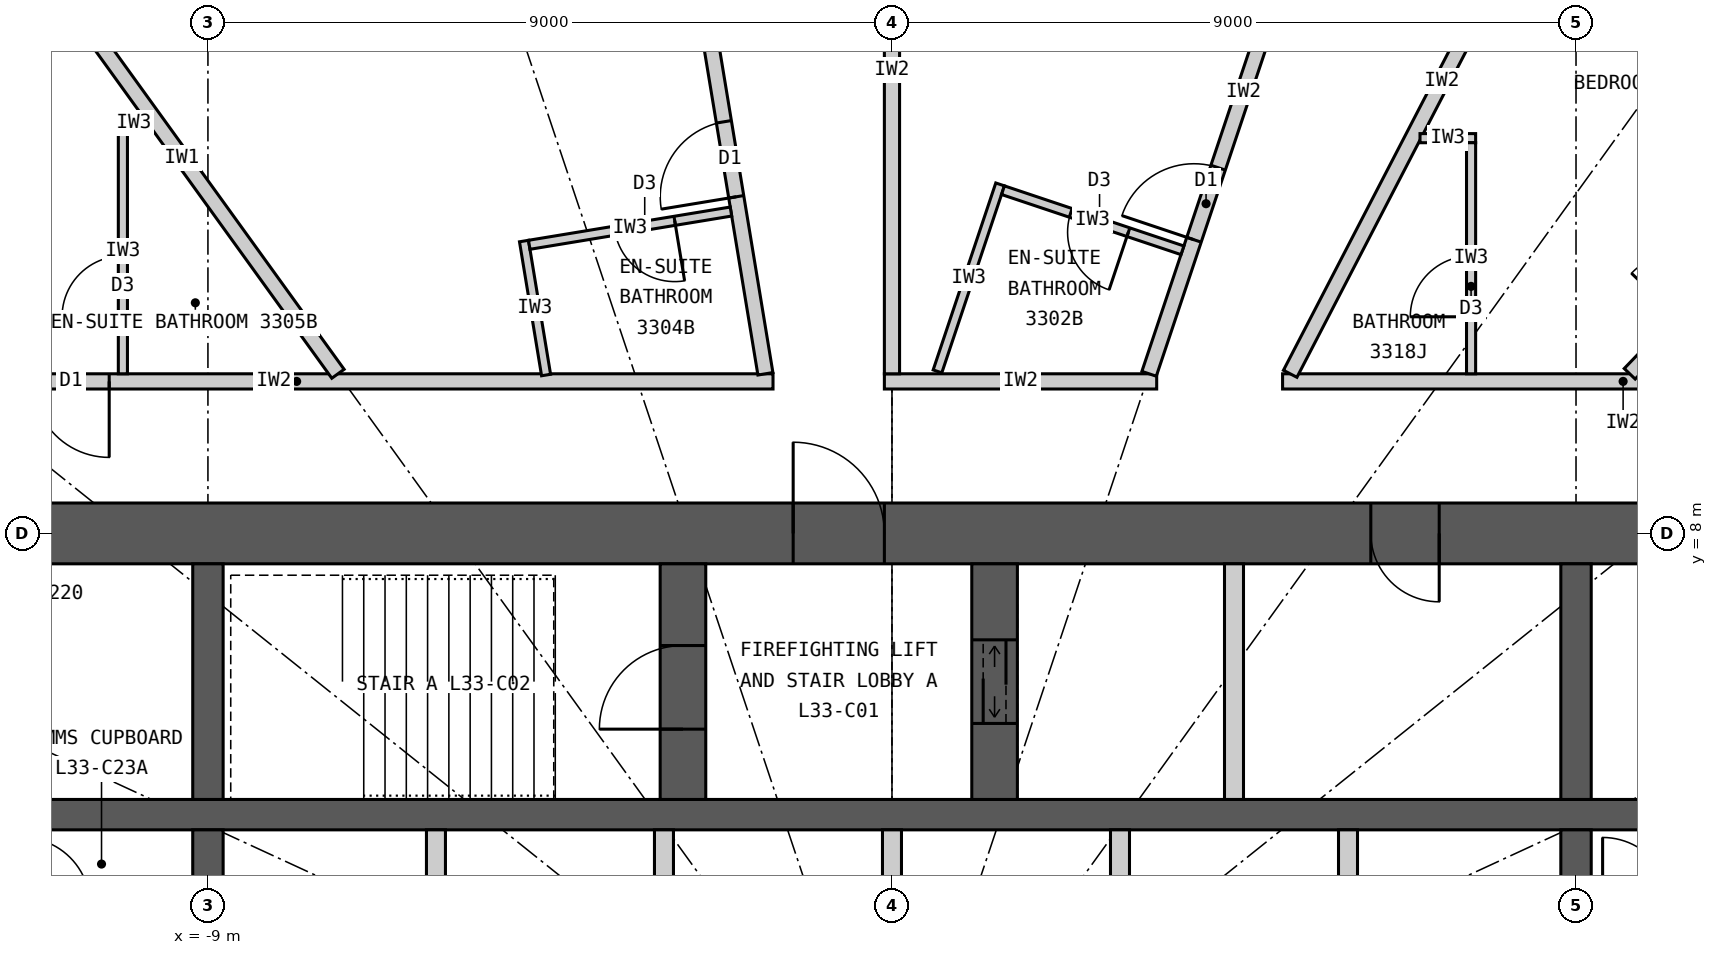
"""IFC4 building model, lengths in metres.
Left out: names, types, materials, properties, quantities, classifications, styles, units other than length and angle.
Written with IfcOpenShell. Run it as: python <this file> out.ifc"""

import sys

from ifc_helpers import new_model, si_unit, direction, frame, frame_2d, origin, place, context, subcontext, project, spatial, rectangle, extrude, element, fill, save


model = new_model("IFC4")
c1 = context("Model", 3, precision=1e-05, world=origin(), true_north=direction((0.0, 1.0)))
c2 = subcontext(c1, "Body", "Model", "MODEL_VIEW")
j1 = project(units=[si_unit("LENGTHUNIT", "METRE"), si_unit("PLANEANGLEUNIT", "RADIAN")], contexts=[c1])
p1 = place(None, origin())
s1 = spatial("IfcSite", under=j1, at=p1, CompositionType="ELEMENT")
p2 = place(p1, origin())
s2 = spatial("IfcBuilding", under=s1, at=p2, CompositionType="ELEMENT")
p3 = place(p2, frame((0.0, 0.0, 128.7)))
s3 = spatial("IfcBuildingStorey", under=s2, at=p3, CompositionType="ELEMENT", Elevation=128.7)
p4 = place(p3, frame((-12.4, 8.0, 0.0), z_axis=(0.0, 0.0, 1.0), x_axis=(1.0, 0.0, 0.0)))
e1 = element("IfcWall", 1, at=p4, inside=s3, PredefinedType="SHEAR", context=c2, shape_type="SweptSolid", body=[
    extrude(rectangle(XDim=24.8, YDim=0.8, at=frame_2d((12.4, 0.0))), origin(), (0.0, 0.0, 1.0), 3.3),
])
p5 = place(p4, frame((11.1, 0.0, 0.0)))
e2 = element("IfcOpeningElement", 2, at=p5, cuts=e1, PredefinedType="OPENING", context=c2, shape_type="SweptSolid", body=[
    extrude(rectangle(XDim=1.2, YDim=2.2, at=frame_2d((0.6, 1.1))), frame((0.0, 0.41, 0.0), z_axis=(0.0, -1.0, 0.0), x_axis=(1.0, 0.0, 0.0)), (0.0, 0.0, 1.0), 0.82),
])
p6 = place(p4, frame((18.7, 0.0, 0.0)))
e3 = element("IfcOpeningElement", 3, at=p6, cuts=e1, PredefinedType="OPENING", context=c2, shape_type="SweptSolid", body=[
    extrude(rectangle(XDim=0.9, YDim=2.2, at=frame_2d((0.45, 1.1))), frame((0.0, 0.41, 0.0), z_axis=(0.0, -1.0, 0.0), x_axis=(1.0, 0.0, 0.0)), (0.0, 0.0, 1.0), 0.82),
])
p7 = place(p3, frame((-11.6, 4.3, 0.0), z_axis=(0.0, 0.0, 1.0), x_axis=(1.0, 0.0, 0.0)))
e4 = element("IfcWall", 4, at=p7, inside=s3, PredefinedType="SHEAR", context=c2, shape_type="SweptSolid", body=[
    extrude(rectangle(XDim=23.2, YDim=0.4, at=frame_2d((11.6, 0.0))), origin(), (0.0, 0.0, 1.0), 3.3),
])
p8 = place(p3, frame((-9.0, 4.5, 0.0), z_axis=(0.0, 0.0, 1.0), x_axis=(0.0, 1.0, 0.0)))
e5 = element("IfcWall", 5, at=p8, inside=s3, PredefinedType="SHEAR", context=c2, shape_type="SweptSolid", body=[
    extrude(rectangle(XDim=3.1, YDim=0.4, at=frame_2d((1.55, 0.0))), origin(), (0.0, 0.0, 1.0), 3.3),
])
p9 = place(p3, frame((-9.0, 1.75, 0.0), z_axis=(0.0, 0.0, 1.0), x_axis=(0.0, 1.0, 0.0)))
e6 = element("IfcWall", 6, at=p9, inside=s3, PredefinedType="SHEAR", context=c2, shape_type="SweptSolid", body=[
    extrude(rectangle(XDim=2.35, YDim=0.4, at=frame_2d((1.175, 0.0))), origin(), (0.0, 0.0, 1.0), 3.3),
])
p10 = place(p3, frame((9.0, 4.5, 0.0), z_axis=(0.0, 0.0, 1.0), x_axis=(0.0, 1.0, 0.0)))
e7 = element("IfcWall", 7, at=p10, inside=s3, PredefinedType="SHEAR", context=c2, shape_type="SweptSolid", body=[
    extrude(rectangle(XDim=3.1, YDim=0.4, at=frame_2d((1.55, 0.0))), origin(), (0.0, 0.0, 1.0), 3.3),
])
p11 = place(p3, frame((9.0, 1.75, 0.0), z_axis=(0.0, 0.0, 1.0), x_axis=(0.0, 1.0, 0.0)))
e8 = element("IfcWall", 8, at=p11, inside=s3, PredefinedType="SHEAR", context=c2, shape_type="SweptSolid", body=[
    extrude(rectangle(XDim=2.35, YDim=0.4, at=frame_2d((1.175, 0.0))), origin(), (0.0, 0.0, 1.0), 3.3),
])
p12 = place(p3, frame((-2.75, 4.5, 0.0), z_axis=(0.0, 0.0, 1.0), x_axis=(0.0, 1.0, 0.0)))
e9 = element("IfcWall", 9, at=p12, inside=s3, PredefinedType="SHEAR", context=c2, shape_type="SweptSolid", body=[
    extrude(rectangle(XDim=3.1, YDim=0.6, at=frame_2d((1.55, 0.0))), origin(), (0.0, 0.0, 1.0), 3.3),
])
p13 = place(p12, frame((0.925, 0.0, 0.0)))
e10 = element("IfcOpeningElement", 10, at=p13, cuts=e9, PredefinedType="OPENING", context=c2, shape_type="SweptSolid", body=[
    extrude(rectangle(XDim=1.1, YDim=2.2, at=frame_2d((0.55, 1.1))), frame((0.0, 0.31, 0.0), z_axis=(0.0, -1.0, 0.0), x_axis=(1.0, 0.0, 0.0)), (0.0, 0.0, 1.0), 0.62),
])
p14 = place(p3, frame((1.35, 4.5, 0.0), z_axis=(0.0, 0.0, 1.0), x_axis=(0.0, 1.0, 0.0)))
e11 = element("IfcWall", 11, at=p14, inside=s3, PredefinedType="SHEAR", context=c2, shape_type="SweptSolid", body=[
    extrude(rectangle(XDim=3.1, YDim=0.6, at=frame_2d((1.55, 0.0))), origin(), (0.0, 0.0, 1.0), 3.3),
])
p15 = place(p14, frame((1.0, 0.0, 0.0)))
e12 = element("IfcOpeningElement", 12, at=p15, cuts=e11, PredefinedType="OPENING", context=c2, shape_type="SweptSolid", body=[
    extrude(rectangle(XDim=1.1, YDim=2.2, at=frame_2d((0.55, 1.1))), frame((0.0, 0.31, 0.0), z_axis=(0.0, -1.0, 0.0), x_axis=(1.0, 0.0, 0.0)), (0.0, 0.0, 1.0), 0.62),
])
p16 = place(p3, frame((4.5, 4.5, 0.0), z_axis=(0.0, 0.0, 1.0), x_axis=(0.0, 1.0, 0.0)))
e13 = element("IfcWall", 13, at=p16, inside=s3, PredefinedType="PARTITIONING", context=c2, shape_type="SweptSolid", body=[
    extrude(rectangle(XDim=3.1, YDim=0.25, at=frame_2d((1.55, 0.0))), origin(), (0.0, 0.0, 1.0), 3.3),
])
for number, where, z_axis, x_axis in (
    (14, (-6.0, 1.75, 0.0), (0.0, 0.0, 1.0), (0.0, 1.0, 0.0)),
    (15, (-3.0, 1.75, 0.0), (0.0, 0.0, 1.0), (0.0, 1.0, 0.0)),
    (16, (0.0, 1.75, 0.0), (0.0, 0.0, 1.0), (0.0, 1.0, 0.0)),
    (17, (3.0, 1.75, 0.0), (0.0, 0.0, 1.0), (0.0, 1.0, 0.0)),
    (18, (6.0, 1.75, 0.0), (0.0, 0.0, 1.0), (0.0, 1.0, 0.0)),
):
    element("IfcWall", number, at=place(p3, frame(where, z_axis=z_axis, x_axis=x_axis)), inside=s3, PredefinedType="PARTITIONING", context=c2, shape_type="SweptSolid", body=[
        extrude(rectangle(XDim=2.35, YDim=0.25, at=frame_2d((1.175, 0.0))), origin(), (0.0, 0.0, 1.0), 3.3),
    ])
p17 = place(p3, frame((-14.1, 10.0, 0.0), z_axis=(0.0, 0.0, 1.0), x_axis=(1.0, 0.0, 0.0)))
e19 = element("IfcWall", 19, at=p17, inside=s3, PredefinedType="PARTITIONING", context=c2, shape_type="SweptSolid", body=[
    extrude(rectangle(XDim=12.535, YDim=0.2, at=frame_2d((6.268, 0.0))), origin(), (0.0, 0.0, 1.0), 3.12),
])
p18 = place(p17, frame((2.801, 0.0, 0.0)))
e20 = element("IfcOpeningElement", 20, at=p18, cuts=e19, PredefinedType="OPENING", context=c2, shape_type="SweptSolid", body=[
    extrude(rectangle(XDim=1.0, YDim=2.2, at=frame_2d((0.5, 1.1))), frame((0.0, 0.11, 0.0), z_axis=(0.0, -1.0, 0.0), x_axis=(1.0, 0.0, 0.0)), (0.0, 0.0, 1.0), 0.22),
])
p19 = place(p3, frame((-0.1, 10.0, 0.0), z_axis=(0.0, 0.0, 1.0), x_axis=(1.0, 0.0, 0.0)))
e21 = element("IfcWall", 21, at=p19, inside=s3, PredefinedType="PARTITIONING", context=c2, shape_type="SweptSolid", body=[
    extrude(rectangle(XDim=3.583, YDim=0.2, at=frame_2d((1.792, 0.0))), origin(), (0.0, 0.0, 1.0), 3.12),
])
p20 = place(p3, frame((5.139, 10.0, 0.0), z_axis=(0.0, 0.0, 1.0), x_axis=(1.0, 0.0, 0.0)))
e22 = element("IfcWall", 22, at=p20, inside=s3, PredefinedType="PARTITIONING", context=c2, shape_type="SweptSolid", body=[
    extrude(rectangle(XDim=8.961, YDim=0.2, at=frame_2d((4.48, 0.0))), origin(), (0.0, 0.0, 1.0), 3.12),
])
p21 = place(p3, frame((9.706, 10.1, 0.0), z_axis=(0.0, 0.0, 1.0), x_axis=(0.692944801824, 0.720990639069, 0.0)))
e23 = element("IfcWall", 23, at=p21, inside=s3, PredefinedType="PARTITIONING", context=c2, shape_type="SweptSolid", body=[
    extrude(rectangle(XDim=7.234, YDim=0.2, at=frame_2d((3.617, 0.0))), origin(), (0.0, 0.0, 1.0), 3.12),
])
p22 = place(p21, frame((0.97, 0.0, 0.0)))
e24 = element("IfcOpeningElement", 24, at=p22, cuts=e23, PredefinedType="OPENING", context=c2, shape_type="SweptSolid", body=[
    extrude(rectangle(XDim=0.9, YDim=2.1, at=frame_2d((0.45, 1.05))), frame((0.0, 0.11, 0.0), z_axis=(0.0, -1.0, 0.0), x_axis=(1.0, 0.0, 0.0)), (0.0, 0.0, 1.0), 0.22),
])
p23 = place(p3, frame((5.239, 10.1, 0.0), z_axis=(0.0, 0.0, 1.0), x_axis=(0.4604797896, 0.887670188398, 0.0)))
e25 = element("IfcWall", 25, at=p23, inside=s3, PredefinedType="PARTITIONING", context=c2, shape_type="SweptSolid", body=[
    extrude(rectangle(XDim=8.676, YDim=0.2, at=frame_2d((4.338, 0.0))), origin(), (0.0, 0.0, 1.0), 3.12),
])
p24 = place(p3, frame((3.383, 10.1, 0.0), z_axis=(0.0, 0.0, 1.0), x_axis=(0.317603705574, 0.948223542318, 0.0)))
e26 = element("IfcWall", 26, at=p24, inside=s3, PredefinedType="PARTITIONING", context=c2, shape_type="SweptSolid", body=[
    extrude(rectangle(XDim=7.823, YDim=0.2, at=frame_2d((3.912, 0.0))), origin(), (0.0, 0.0, 1.0), 2.37),
])
p25 = place(p24, frame((1.86, 0.0, 0.0)))
e27 = element("IfcOpeningElement", 27, at=p25, cuts=e26, PredefinedType="OPENING", context=c2, shape_type="SweptSolid", body=[
    extrude(rectangle(XDim=1.0, YDim=2.2, at=frame_2d((0.5, 1.1))), frame((0.0, 0.11, 0.0), z_axis=(0.0, -1.0, 0.0), x_axis=(1.0, 0.0, 0.0)), (0.0, 0.0, 1.0), 0.22),
])
p26 = place(p3, frame((0.0, 10.1, 0.0), z_axis=(0.0, 0.0, 1.0), x_axis=(0.0, 1.0, 0.0)))
e28 = element("IfcWall", 28, at=p26, inside=s3, PredefinedType="PARTITIONING", context=c2, shape_type="SweptSolid", body=[
    extrude(rectangle(XDim=8.0, YDim=0.2, at=frame_2d((4.0, 0.0))), origin(), (0.0, 0.0, 1.0), 2.37),
])
p27 = place(p3, frame((-1.665, 10.1, 0.0), z_axis=(0.0, 0.0, 1.0), x_axis=(-0.162660519103, 0.986682094459, 0.0)))
e29 = element("IfcWall", 29, at=p27, inside=s3, PredefinedType="PARTITIONING", context=c2, shape_type="SweptSolid", body=[
    extrude(rectangle(XDim=9.111, YDim=0.2, at=frame_2d((4.555, 0.0))), origin(), (0.0, 0.0, 1.0), 3.12),
])
p28 = place(p27, frame((2.36, 0.0, 0.0)))
e30 = element("IfcOpeningElement", 30, at=p28, cuts=e29, PredefinedType="OPENING", context=c2, shape_type="SweptSolid", body=[
    extrude(rectangle(XDim=1.0, YDim=2.2, at=frame_2d((0.5, 1.1))), frame((0.0, 0.11, 0.0), z_axis=(0.0, -1.0, 0.0), x_axis=(1.0, 0.0, 0.0)), (0.0, 0.0, 1.0), 0.22),
])
p29 = place(p3, frame((-7.289, 10.1, 0.0), z_axis=(0.0, 0.0, 1.0), x_axis=(-0.585217367024, 0.81087645997, 0.0)))
e31 = element("IfcWall", 31, at=p29, inside=s3, PredefinedType="PARTITIONING", context=c2, shape_type="SweptSolid", body=[
    extrude(rectangle(XDim=7.016, YDim=0.2, at=frame_2d((3.508, 0.0))), origin(), (0.0, 0.0, 1.0), 2.37),
])
p30 = place(p3, frame((0.599, 10.132, 0.0), z_axis=(0.0, 0.0, 1.0), x_axis=(0.317554522053, 0.948240014724, 0.0)))
e32 = element("IfcWall", 32, at=p30, inside=s3, PredefinedType="PARTITIONING", context=c2, shape_type="SweptSolid", body=[
    extrude(rectangle(XDim=2.594, YDim=0.12, at=frame_2d((1.297, 0.0))), origin(), (0.0, 0.0, 1.0), 3.12),
])
p31 = place(p3, frame((3.822, 11.725, 0.0), z_axis=(0.0, 0.0, 1.0), x_axis=(-0.948231307998, 0.317580519761, 0.0)))
e33 = element("IfcWall", 33, at=p31, inside=s3, PredefinedType="PARTITIONING", context=c2, shape_type="SweptSolid", body=[
    extrude(rectangle(XDim=2.49, YDim=0.12, at=frame_2d((1.245, 0.0))), origin(), (0.0, 0.0, 1.0), 3.12),
])
p32 = place(p31, frame((0.75, 0.0, 0.0)))
e34 = element("IfcOpeningElement", 34, at=p32, cuts=e33, PredefinedType="OPENING", context=c2, shape_type="SweptSolid", body=[
    extrude(rectangle(XDim=0.8, YDim=2.1, at=frame_2d((0.4, 1.05))), frame((0.0, 0.07, 0.0), z_axis=(0.0, -1.0, 0.0), x_axis=(1.0, 0.0, 0.0)), (0.0, 0.0, 1.0), 0.14),
])
p33 = place(p3, frame((-4.551, 10.084, 0.0), z_axis=(0.0, 0.0, 1.0), x_axis=(-0.162625830583, 0.986687812445, 0.0)))
e35 = element("IfcWall", 35, at=p33, inside=s3, PredefinedType="PARTITIONING", context=c2, shape_type="SweptSolid", body=[
    extrude(rectangle(XDim=1.786, YDim=0.12, at=frame_2d((0.893, 0.0))), origin(), (0.0, 0.0, 1.0), 3.12),
])
p34 = place(p3, frame((-2.118, 12.235, 0.0), z_axis=(0.0, 0.0, 1.0), x_axis=(-0.986686682911, -0.16263268357, 0.0)))
e36 = element("IfcWall", 36, at=p34, inside=s3, PredefinedType="PARTITIONING", context=c2, shape_type="SweptSolid", body=[
    extrude(rectangle(XDim=2.69, YDim=0.12, at=frame_2d((1.345, 0.0))), origin(), (0.0, 0.0, 1.0), 3.12),
])
p35 = place(p34, frame((0.75, 0.0, 0.0)))
e37 = element("IfcOpeningElement", 37, at=p35, cuts=e36, PredefinedType="OPENING", context=c2, shape_type="SweptSolid", body=[
    extrude(rectangle(XDim=0.8, YDim=2.1, at=frame_2d((0.4, 1.05))), frame((0.0, 0.07, 0.0), z_axis=(0.0, -1.0, 0.0), x_axis=(1.0, 0.0, 0.0)), (0.0, 0.0, 1.0), 0.14),
])
p36 = place(p3, frame((-9.771, 13.4, 0.0), z_axis=(0.0, 0.0, 1.0), x_axis=(-1.0, 0.0, 0.0)))
e38 = element("IfcWall", 38, at=p36, inside=s3, PredefinedType="PARTITIONING", context=c2, shape_type="SweptSolid", body=[
    extrude(rectangle(XDim=0.408, YDim=0.12, at=frame_2d((0.204, 0.0))), origin(), (0.0, 0.0, 1.0), 3.12),
])
p37 = place(p3, frame((-10.119, 10.1, 0.0), z_axis=(0.0, 0.0, 1.0), x_axis=(0.0, 1.0, 0.0)))
e39 = element("IfcWall", 39, at=p37, inside=s3, PredefinedType="PARTITIONING", context=c2, shape_type="SweptSolid", body=[
    extrude(rectangle(XDim=3.24, YDim=0.12, at=frame_2d((1.62, 0.0))), origin(), (0.0, 0.0, 1.0), 3.12),
])
p38 = place(p37, frame((0.75, 0.0, 0.0)))
e40 = element("IfcOpeningElement", 40, at=p38, cuts=e39, PredefinedType="OPENING", context=c2, shape_type="SweptSolid", body=[
    extrude(rectangle(XDim=0.8, YDim=2.1, at=frame_2d((0.4, 1.05))), frame((0.0, 0.07, 0.0), z_axis=(0.0, -1.0, 0.0), x_axis=(1.0, 0.0, 0.0)), (0.0, 0.0, 1.0), 0.14),
])
p39 = place(p3, frame((6.947, 13.2, 0.0), z_axis=(0.0, 0.0, 1.0), x_axis=(1.0, 0.0, 0.0)))
e41 = element("IfcWall", 41, at=p39, inside=s3, PredefinedType="PARTITIONING", context=c2, shape_type="SweptSolid", body=[
    extrude(rectangle(XDim=0.732, YDim=0.12, at=frame_2d((0.366, 0.0))), origin(), (0.0, 0.0, 1.0), 3.12),
])
p40 = place(p3, frame((7.619, 10.1, 0.0), z_axis=(0.0, 0.0, 1.0), x_axis=(0.0, 1.0, 0.0)))
e42 = element("IfcWall", 42, at=p40, inside=s3, PredefinedType="PARTITIONING", context=c2, shape_type="SweptSolid", body=[
    extrude(rectangle(XDim=3.04, YDim=0.12, at=frame_2d((1.52, 0.0))), origin(), (0.0, 0.0, 1.0), 3.12),
])
p41 = place(p40, frame((0.75, 0.0, 0.0)))
e43 = element("IfcOpeningElement", 43, at=p41, cuts=e42, PredefinedType="OPENING", context=c2, shape_type="SweptSolid", body=[
    extrude(rectangle(XDim=0.8, YDim=2.1, at=frame_2d((0.4, 1.05))), frame((0.0, 0.07, 0.0), z_axis=(0.0, -1.0, 0.0), x_axis=(1.0, 0.0, 0.0)), (0.0, 0.0, 1.0), 0.14),
])
p42 = place(p32, origin())
e44 = element("IfcDoor", 44, at=p42, inside=s3, OperationType="SINGLE_SWING_LEFT", PredefinedType="DOOR", context=c2, shape_type="SweptSolid", body=[
    extrude(rectangle(XDim=0.8, YDim=2.1, at=frame_2d((0.4, 1.05))), frame((0.0, 0.025, 0.0), z_axis=(0.0, -1.0, 0.0), x_axis=(1.0, 0.0, 0.0)), (0.0, 0.0, 1.0), 0.05),
])
fill(e34, e44)
p43 = place(p25, origin())
e45 = element("IfcDoor", 45, at=p43, inside=s3, OperationType="SINGLE_SWING_LEFT", PredefinedType="DOOR", context=c2, shape_type="SweptSolid", body=[
    extrude(rectangle(XDim=1.0, YDim=2.2, at=frame_2d((0.5, 1.1))), frame((0.0, 0.025, 0.0), z_axis=(0.0, -1.0, 0.0), x_axis=(1.0, 0.0, 0.0)), (0.0, 0.0, 1.0), 0.05),
])
fill(e27, e45)
p44 = place(p35, origin())
e46 = element("IfcDoor", 46, at=p44, inside=s3, OperationType="SINGLE_SWING_LEFT", PredefinedType="DOOR", context=c2, shape_type="SweptSolid", body=[
    extrude(rectangle(XDim=0.8, YDim=2.1, at=frame_2d((0.4, 1.05))), frame((0.0, 0.025, 0.0), z_axis=(0.0, -1.0, 0.0), x_axis=(1.0, 0.0, 0.0)), (0.0, 0.0, 1.0), 0.05),
])
fill(e37, e46)
p45 = place(p28, origin())
e47 = element("IfcDoor", 47, at=p45, inside=s3, OperationType="SINGLE_SWING_LEFT", PredefinedType="DOOR", context=c2, shape_type="SweptSolid", body=[
    extrude(rectangle(XDim=1.0, YDim=2.2, at=frame_2d((0.5, 1.1))), frame((0.0, 0.025, 0.0), z_axis=(0.0, -1.0, 0.0), x_axis=(1.0, 0.0, 0.0)), (0.0, 0.0, 1.0), 0.05),
])
fill(e30, e47)
p46 = place(p38, origin())
e48 = element("IfcDoor", 48, at=p46, inside=s3, OperationType="SINGLE_SWING_LEFT", PredefinedType="DOOR", context=c2, shape_type="SweptSolid", body=[
    extrude(rectangle(XDim=0.8, YDim=2.1, at=frame_2d((0.4, 1.05))), frame((0.0, 0.025, 0.0), z_axis=(0.0, -1.0, 0.0), x_axis=(1.0, 0.0, 0.0)), (0.0, 0.0, 1.0), 0.05),
])
fill(e40, e48)
p47 = place(p18, origin())
e49 = element("IfcDoor", 49, at=p47, inside=s3, OperationType="SINGLE_SWING_RIGHT", PredefinedType="DOOR", context=c2, shape_type="SweptSolid", body=[
    extrude(rectangle(XDim=1.0, YDim=2.2, at=frame_2d((0.5, 1.1))), frame((0.0, 0.025, 0.0), z_axis=(0.0, -1.0, 0.0), x_axis=(1.0, 0.0, 0.0)), (0.0, 0.0, 1.0), 0.05),
])
fill(e20, e49)
p48 = place(p41, origin())
e50 = element("IfcDoor", 50, at=p48, inside=s3, OperationType="SINGLE_SWING_LEFT", PredefinedType="DOOR", context=c2, shape_type="SweptSolid", body=[
    extrude(rectangle(XDim=0.8, YDim=2.1, at=frame_2d((0.4, 1.05))), frame((0.0, 0.025, 0.0), z_axis=(0.0, -1.0, 0.0), x_axis=(1.0, 0.0, 0.0)), (0.0, 0.0, 1.0), 0.05),
])
fill(e43, e50)
p49 = place(p5, origin())
e51 = element("IfcDoor", 51, at=p49, inside=s3, OperationType="SINGLE_SWING_LEFT", PredefinedType="DOOR", context=c2, shape_type="SweptSolid", body=[
    extrude(rectangle(XDim=1.2, YDim=2.2, at=frame_2d((0.6, 1.1))), frame((0.0, 0.025, 0.0), z_axis=(0.0, -1.0, 0.0), x_axis=(1.0, 0.0, 0.0)), (0.0, 0.0, 1.0), 0.05),
])
fill(e2, e51)
p50 = place(p13, origin())
e52 = element("IfcDoor", 52, at=p50, inside=s3, OperationType="SINGLE_SWING_LEFT", PredefinedType="DOOR", context=c2, shape_type="SweptSolid", body=[
    extrude(rectangle(XDim=1.1, YDim=2.2, at=frame_2d((0.55, 1.1))), frame((0.0, 0.025, 0.0), z_axis=(0.0, -1.0, 0.0), x_axis=(1.0, 0.0, 0.0)), (0.0, 0.0, 1.0), 0.05),
])
fill(e10, e52)
p51 = place(p15, origin())
e53 = element("IfcDoor", 53, at=p51, inside=s3, OperationType="DOUBLE_DOOR_SLIDING", PredefinedType="DOOR", context=c2, shape_type="SweptSolid", body=[
    extrude(rectangle(XDim=1.1, YDim=2.2, at=frame_2d((0.55, 1.1))), frame((0.0, 0.025, 0.0), z_axis=(0.0, -1.0, 0.0), x_axis=(1.0, 0.0, 0.0)), (0.0, 0.0, 1.0), 0.05),
])
fill(e12, e53)
p52 = place(p6, origin())
e54 = element("IfcDoor", 54, at=p52, inside=s3, OperationType="SINGLE_SWING_RIGHT", PredefinedType="DOOR", context=c2, shape_type="SweptSolid", body=[
    extrude(rectangle(XDim=0.9, YDim=2.2, at=frame_2d((0.45, 1.1))), frame((0.0, 0.025, 0.0), z_axis=(0.0, -1.0, 0.0), x_axis=(1.0, 0.0, 0.0)), (0.0, 0.0, 1.0), 0.05),
])
fill(e3, e54)
save(model, sys.argv[1])
